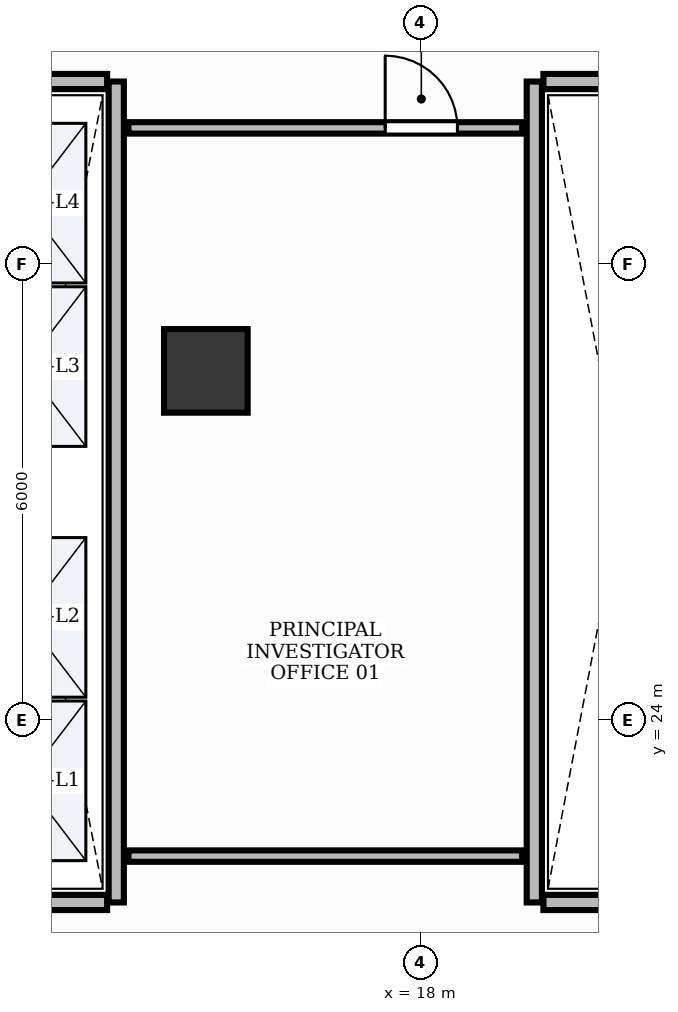
"""IFC4 building model, lengths in metres.
Left out: names, types, materials, properties, quantities, classifications, styles, units other than length and angle.
Written with IfcOpenShell. Run it as: python <this file> out.ifc"""

import sys

from ifc_helpers import new_model, si_unit, direction, frame, frame_2d, origin, origin_2d, place, context, subcontext, project, spatial, rectangle, extrude, element, fill, save


model = new_model("IFC4")
c1 = context("Model", 3, precision=1e-05, world=origin(), true_north=direction((0.0, 1.0)))
c2 = subcontext(c1, "Body", "Model", "MODEL_VIEW")
j1 = project(units=[si_unit("LENGTHUNIT", "METRE"), si_unit("PLANEANGLEUNIT", "RADIAN")], contexts=[c1])
p1 = place(None, origin())
s1 = spatial("IfcSite", under=j1, at=p1, CompositionType="ELEMENT")
p2 = place(p1, origin())
s2 = spatial("IfcBuilding", under=s1, at=p2, CompositionType="ELEMENT")
p3 = place(p2, frame((0.0, 0.0, 30.0)))
s3 = spatial("IfcBuildingStorey", under=s2, at=p3, CompositionType="ELEMENT", Elevation=30.0)
p4 = place(p3, frame((15.179, 28.594, -0.0), z_axis=(0.0, 0.0, 1.0), x_axis=(1.0, 0.0, 0.0)))
e1 = element("IfcColumn", 1, at=p4, inside=s3, PredefinedType="COLUMN", context=c2, shape_type="SweptSolid", body=[
    extrude(rectangle(XDim=1.1, YDim=1.1, at=origin_2d()), origin(), (0.0, 0.0, 1.0), 3.901),
])
p5 = place(p3, frame((14.0, 21.6, 0.0), z_axis=(0.0, 0.0, 1.0), x_axis=(0.0, 1.0, 0.0)))
e2 = element("IfcWall", 2, at=p5, inside=s3, PredefinedType="PARTITIONING", context=c2, shape_type="SweptSolid", body=[
    extrude(rectangle(XDim=10.8, YDim=0.2, at=frame_2d((5.4, 0.0))), origin(), (0.0, 0.0, 1.0), 2.91),
])
for number, where, z_axis, x_axis in (
    (3, (11.72, 21.6, 0.0), (0.0, 0.0, 1.0), (1.0, 0.0, 0.0)),
    (4, (11.72, 32.4, 0.0), (0.0, 0.0, 1.0), (1.0, 0.0, 0.0)),
):
    element("IfcWall", number, at=place(p3, frame(where, z_axis=z_axis, x_axis=x_axis)), inside=s3, PredefinedType="PARTITIONING", context=c2, shape_type="SweptSolid", body=[
        extrude(rectangle(XDim=2.16, YDim=0.2, at=frame_2d((1.08, 0.0))), origin(), (0.0, 0.0, 1.0), 2.91),
    ])
p6 = place(p3, frame((19.5, 21.6, 0.0), z_axis=(0.0, 0.0, 1.0), x_axis=(0.0, 1.0, 0.0)))
e5 = element("IfcWall", 5, at=p6, inside=s3, PredefinedType="PARTITIONING", context=c2, shape_type="SweptSolid", body=[
    extrude(rectangle(XDim=10.8, YDim=0.2, at=frame_2d((5.4, 0.0))), origin(), (0.0, 0.0, 1.0), 2.91),
])
for number, where, z_axis, x_axis in (
    (6, (19.62, 21.6, 0.0), (0.0, 0.0, 1.0), (1.0, 0.0, 0.0)),
    (7, (19.62, 32.4, 0.0), (0.0, 0.0, 1.0), (1.0, 0.0, 0.0)),
):
    element("IfcWall", number, at=place(p3, frame(where, z_axis=z_axis, x_axis=x_axis)), inside=s3, PredefinedType="PARTITIONING", context=c2, shape_type="SweptSolid", body=[
        extrude(rectangle(XDim=2.11, YDim=0.2, at=frame_2d((1.055, 0.0))), origin(), (0.0, 0.0, 1.0), 2.91),
    ])
p7 = place(p3, frame((14.16, 31.79, 0.0), z_axis=(0.0, 0.0, 1.0), x_axis=(1.0, 0.0, 0.0)))
e8 = element("IfcWall", 8, at=p7, inside=s3, PredefinedType="PARTITIONING", context=c2, shape_type="SweptSolid", body=[
    extrude(rectangle(XDim=5.18, YDim=0.15, at=frame_2d((2.59, 0.0))), origin(), (0.0, 0.0, 1.0), 2.91),
])
p8 = place(p7, frame((3.378, 0.0, 0.0)))
e9 = element("IfcOpeningElement", 9, at=p8, cuts=e8, PredefinedType="OPENING", context=c2, shape_type="SweptSolid", body=[
    extrude(rectangle(XDim=0.95, YDim=2.15, at=frame_2d((0.475, 1.075))), frame((0.0, 0.09, 0.0), z_axis=(0.0, -1.0, 0.0), x_axis=(1.0, 0.0, 0.0)), (0.0, 0.0, 1.0), 0.18),
])
p9 = place(p3, frame((19.34, 22.21, 0.0), z_axis=(0.0, 0.0, 1.0), x_axis=(-1.0, 0.0, 0.0)))
e10 = element("IfcWall", 10, at=p9, inside=s3, PredefinedType="PARTITIONING", context=c2, shape_type="SweptSolid", body=[
    extrude(rectangle(XDim=5.18, YDim=0.15, at=frame_2d((2.59, 0.0))), origin(), (0.0, 0.0, 1.0), 2.91),
])
p10 = place(p8, origin())
e11 = element("IfcDoor", 11, at=p10, inside=s3, OperationType="SINGLE_SWING_LEFT", PredefinedType="DOOR", context=c2, shape_type="SweptSolid", body=[
    extrude(rectangle(XDim=0.95, YDim=2.15, at=frame_2d((0.475, 1.075))), frame((0.0, 0.025, 0.0), z_axis=(0.0, -1.0, 0.0), x_axis=(1.0, 0.0, 0.0)), (0.0, 0.0, 1.0), 0.05),
])
fill(e9, e11)
save(model, sys.argv[1])
